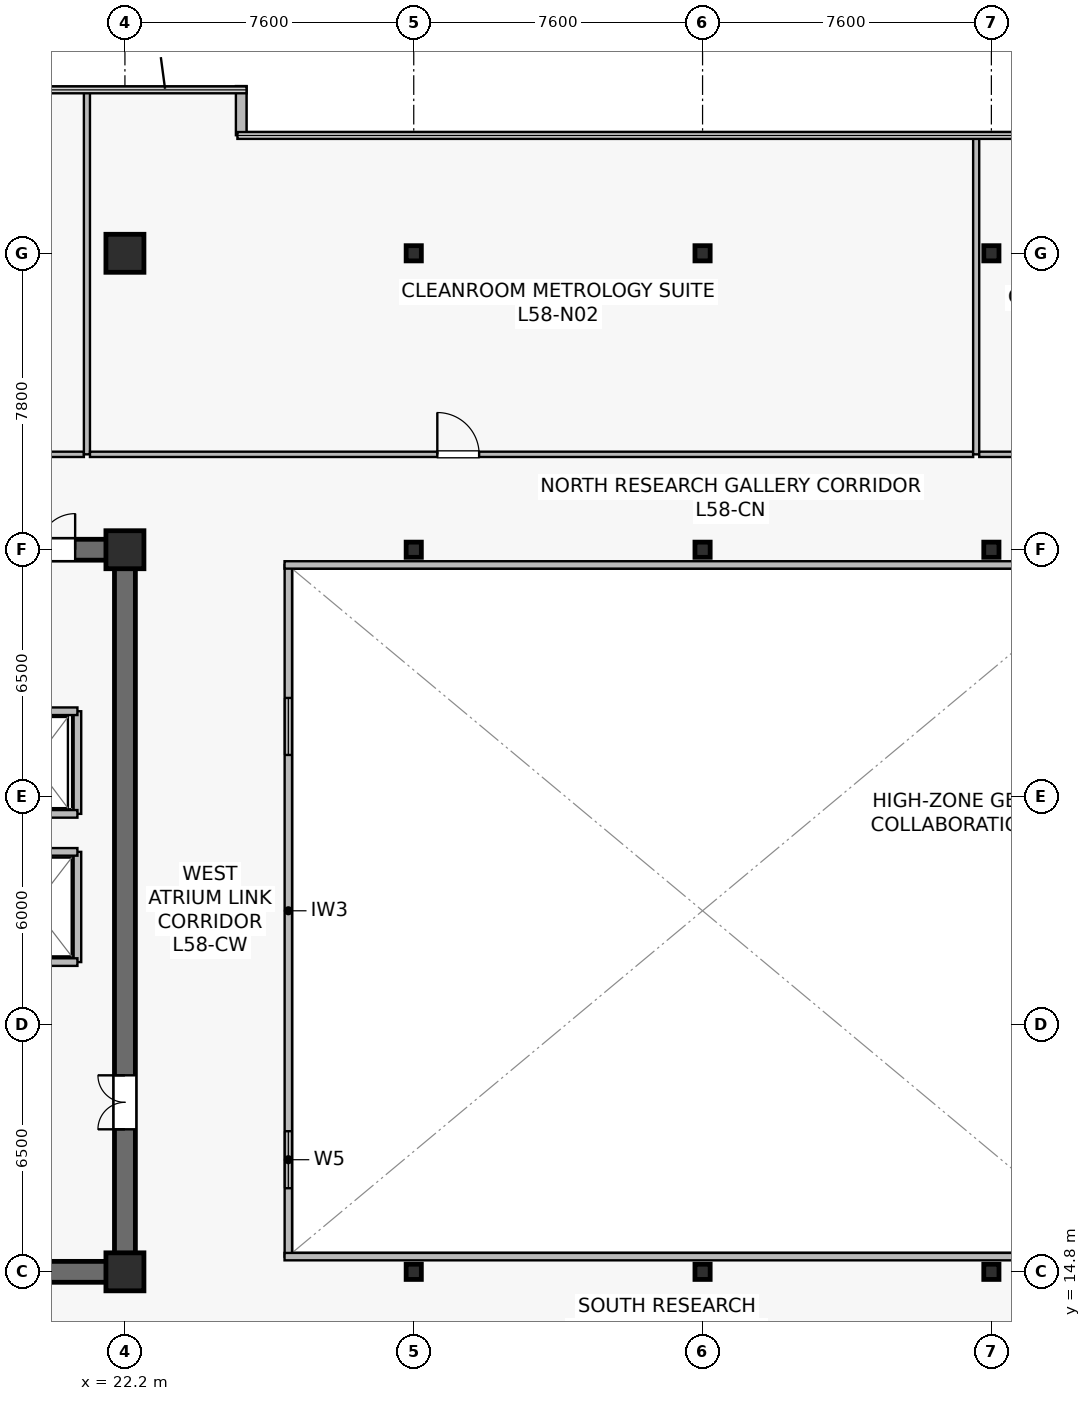
"""IFC4 building model, lengths in metres.
Left out: names, types, materials, properties, quantities, classifications, styles, units other than length and angle.
Written with IfcOpenShell. Run it as: python <this file> out.ifc"""

import sys

from ifc_helpers import new_model, si_unit, direction, frame, frame_2d, origin, origin_2d, place, context, subcontext, project, spatial, rectangle, hollow_rectangle, extrude, source, transform, mapped, element, fill, save


model = new_model("IFC4")
c1 = context("Model", 3, precision=1e-05, world=origin(), true_north=direction((0.0, 1.0)))
c2 = subcontext(c1, "Body", "Model", "MODEL_VIEW")
j1 = project(units=[si_unit("LENGTHUNIT", "METRE"), si_unit("PLANEANGLEUNIT", "RADIAN")], contexts=[c1])
p1 = place(None, origin())
s1 = spatial("IfcSite", under=j1, at=p1, CompositionType="ELEMENT")
p2 = place(p1, origin())
s2 = spatial("IfcBuilding", under=s1, at=p2, CompositionType="ELEMENT")
p3 = place(p2, frame((0.0, 0.0, 242.4)))
s3 = spatial("IfcBuildingStorey", under=s2, at=p3, CompositionType="ELEMENT", Elevation=242.4)
p4 = place(p3, frame((7.125, 14.8, 0.0), z_axis=(0.0, 0.0, 1.0), x_axis=(1.0, 0.0, 0.0)))
e1 = element("IfcWall", 1, at=p4, inside=s3, PredefinedType="SHEAR", context=c2, shape_type="SweptSolid", body=[
    extrude(rectangle(XDim=15.35, YDim=0.55, at=frame_2d((7.675, 0.0))), origin(), (0.0, 0.0, 1.0), 3.8),
])
p5 = place(p3, frame((7.125, 33.8, 0.0), z_axis=(0.0, 0.0, 1.0), x_axis=(1.0, 0.0, 0.0)))
e2 = element("IfcWall", 2, at=p5, inside=s3, PredefinedType="SHEAR", context=c2, shape_type="SweptSolid", body=[
    extrude(rectangle(XDim=15.35, YDim=0.55, at=frame_2d((7.675, 0.0))), origin(), (0.0, 0.0, 1.0), 3.8),
])
p6 = place(p5, frame((5.2, 0.0, 0.0)))
e3 = element("IfcOpeningElement", 3, at=p6, cuts=e2, PredefinedType="OPENING", context=c2, shape_type="SweptSolid", body=[
    extrude(rectangle(XDim=0.95, YDim=2.15, at=frame_2d((0.475, 1.075))), frame((0.0, 0.285, 0.0), z_axis=(0.0, -1.0, 0.0), x_axis=(1.0, 0.0, 0.0)), (0.0, 0.0, 1.0), 0.57),
])
p7 = place(p5, frame((7.715, 0.0, 0.0)))
e4 = element("IfcOpeningElement", 4, at=p7, cuts=e2, PredefinedType="OPENING", context=c2, shape_type="SweptSolid", body=[
    extrude(rectangle(XDim=0.95, YDim=2.15, at=frame_2d((0.475, 1.075))), frame((0.0, 0.285, 0.0), z_axis=(0.0, -1.0, 0.0), x_axis=(1.0, 0.0, 0.0)), (0.0, 0.0, 1.0), 0.57),
])
p8 = place(p5, frame((10.265, 0.0, 0.0)))
e5 = element("IfcOpeningElement", 5, at=p8, cuts=e2, PredefinedType="OPENING", context=c2, shape_type="SweptSolid", body=[
    extrude(rectangle(XDim=0.95, YDim=2.15, at=frame_2d((0.475, 1.075))), frame((0.0, 0.285, 0.0), z_axis=(0.0, -1.0, 0.0), x_axis=(1.0, 0.0, 0.0)), (0.0, 0.0, 1.0), 0.57),
])
p9 = place(p5, frame((12.815, 0.0, 0.0)))
e6 = element("IfcOpeningElement", 6, at=p9, cuts=e2, PredefinedType="OPENING", context=c2, shape_type="SweptSolid", body=[
    extrude(rectangle(XDim=0.95, YDim=2.15, at=frame_2d((0.475, 1.075))), frame((0.0, 0.285, 0.0), z_axis=(0.0, -1.0, 0.0), x_axis=(1.0, 0.0, 0.0)), (0.0, 0.0, 1.0), 0.57),
])
p10 = place(p3, frame((22.2, 15.075, 0.0), z_axis=(0.0, 0.0, 1.0), x_axis=(0.0, 1.0, 0.0)))
e7 = element("IfcWall", 7, at=p10, inside=s3, PredefinedType="SHEAR", context=c2, shape_type="SweptSolid", body=[
    extrude(rectangle(XDim=18.45, YDim=0.55, at=frame_2d((9.225, 0.0))), origin(), (0.0, 0.0, 1.0), 3.8),
])
p11 = place(p10, frame((3.475, 0.0, 0.0)))
e8 = element("IfcOpeningElement", 8, at=p11, cuts=e7, PredefinedType="OPENING", context=c2, shape_type="SweptSolid", body=[
    extrude(rectangle(XDim=1.42, YDim=2.2, at=frame_2d((0.71, 1.1))), frame((0.0, 0.285, 0.0), z_axis=(0.0, -1.0, 0.0), x_axis=(1.0, 0.0, 0.0)), (0.0, 0.0, 1.0), 0.57),
])
m1 = source(origin(), c2, "Body", "SweptSolid", [
    extrude(rectangle(XDim=1.0, YDim=1.0, at=origin_2d()), origin(), (0.0, 0.0, 1.0), 4.1),
])
for number, where, z_axis, x_axis in (
    (9, (22.2, 14.8, 0.0), (0.0, 0.0, 1.0), (1.0, 0.0, 0.0)),
    (10, (22.2, 33.8, 0.0), (0.0, 0.0, 1.0), (1.0, 0.0, 0.0)),
    (11, (22.2, 41.6, 0.0), (0.0, 0.0, 1.0), (1.0, 0.0, 0.0)),
):
    element("IfcColumn", number, at=place(p3, frame(where, z_axis=z_axis, x_axis=x_axis)), inside=s3, PredefinedType="COLUMN", context=c2, shape_type="MappedRepresentation", body=[
        mapped(m1, transform((0.0, 0.0, 0.0), scale=1.0)),
    ])
m2 = source(origin(), c2, "Body", "SweptSolid", [
    extrude(hollow_rectangle(XDim=0.4, YDim=0.4, WallThickness=0.019, at=origin_2d()), origin(), (0.0, 0.0, 1.0), 4.1),
])
for number, where, z_axis, x_axis in (
    (12, (29.8, 14.8, 0.0), (0.0, 0.0, 1.0), (1.0, 0.0, 0.0)),
    (13, (29.8, 33.8, 0.0), (0.0, 0.0, 1.0), (1.0, 0.0, 0.0)),
    (14, (29.8, 41.6, 0.0), (0.0, 0.0, 1.0), (1.0, 0.0, 0.0)),
    (15, (37.4, 14.8, 0.0), (0.0, 0.0, 1.0), (1.0, 0.0, 0.0)),
    (16, (37.4, 33.8, 0.0), (0.0, 0.0, 1.0), (1.0, 0.0, 0.0)),
    (17, (37.4, 41.6, 0.0), (0.0, 0.0, 1.0), (1.0, 0.0, 0.0)),
    (18, (45.0, 14.8, 0.0), (0.0, 0.0, 1.0), (1.0, 0.0, 0.0)),
    (19, (45.0, 33.8, 0.0), (0.0, 0.0, 1.0), (1.0, 0.0, 0.0)),
    (20, (45.0, 41.6, 0.0), (0.0, 0.0, 1.0), (1.0, 0.0, 0.0)),
):
    element("IfcColumn", number, at=place(p3, frame(where, z_axis=z_axis, x_axis=x_axis)), inside=s3, PredefinedType="COLUMN", context=c2, shape_type="MappedRepresentation", body=[
        mapped(m2, transform((0.0, 0.0, 0.0), scale=1.0)),
    ])
p12 = place(p3, frame((25.26, 44.707, 0.0), z_axis=(0.0, 0.0, 1.0), x_axis=(0.0, 1.0, 0.0)))
e21 = element("IfcWall", 21, at=p12, inside=s3, PredefinedType="STANDARD", context=c2, shape_type="SweptSolid", body=[
    extrude(rectangle(XDim=1.293, YDim=0.28, at=frame_2d((0.646, 0.0))), origin(), (0.0, 0.0, 1.0), 3.8),
])
p13 = place(p3, frame((20.95, 26.85, 0.0), z_axis=(0.0, 0.0, 1.0), x_axis=(0.0, 1.0, 0.0)))
e22 = element("IfcWall", 22, at=p13, inside=s3, PredefinedType="SOLIDWALL", context=c2, shape_type="SweptSolid", body=[
    extrude(rectangle(XDim=2.7, YDim=0.2, at=frame_2d((1.35, 0.0))), origin(), (0.0, 0.0, 1.0), 3.8),
])
p14 = place(p3, frame((18.76, 29.55, 0.0), z_axis=(0.0, 0.0, 1.0), x_axis=(1.0, 0.0, 0.0)))
e23 = element("IfcWall", 23, at=p14, inside=s3, PredefinedType="SOLIDWALL", context=c2, shape_type="SweptSolid", body=[
    extrude(rectangle(XDim=2.19, YDim=0.2, at=frame_2d((1.095, 0.0))), origin(), (0.0, 0.0, 1.0), 3.8),
])
p15 = place(p3, frame((18.76, 26.85, 0.0), z_axis=(0.0, 0.0, 1.0), x_axis=(1.0, 0.0, 0.0)))
e24 = element("IfcWall", 24, at=p15, inside=s3, PredefinedType="SOLIDWALL", context=c2, shape_type="SweptSolid", body=[
    extrude(rectangle(XDim=2.19, YDim=0.2, at=frame_2d((1.095, 0.0))), origin(), (0.0, 0.0, 1.0), 3.197),
])
p16 = place(p3, frame((20.95, 22.95, 0.0), z_axis=(0.0, 0.0, 1.0), x_axis=(0.0, 1.0, 0.0)))
e25 = element("IfcWall", 25, at=p16, inside=s3, PredefinedType="SOLIDWALL", context=c2, shape_type="SweptSolid", body=[
    extrude(rectangle(XDim=2.9, YDim=0.2, at=frame_2d((1.45, 0.0))), origin(), (0.0, 0.0, 1.0), 2.935),
])
for number, where, z_axis, x_axis in (
    (26, (18.76, 25.85, 0.0), (0.0, 0.0, 1.0), (1.0, 0.0, 0.0)),
    (27, (18.76, 22.95, 0.0), (0.0, 0.0, 1.0), (1.0, 0.0, 0.0)),
):
    element("IfcWall", number, at=place(p3, frame(where, z_axis=z_axis, x_axis=x_axis)), inside=s3, PredefinedType="SOLIDWALL", context=c2, shape_type="SweptSolid", body=[
        extrude(rectangle(XDim=2.19, YDim=0.2, at=frame_2d((1.095, 0.0))), origin(), (0.0, 0.0, 1.0), 3.8),
    ])
p17 = place(p3, frame((26.5, 15.2, 0.0), z_axis=(0.0, 0.0, 1.0), x_axis=(0.0, 1.0, 0.0)))
e28 = element("IfcWall", 28, at=p17, inside=s3, PredefinedType="SOLIDWALL", context=c2, shape_type="SweptSolid", body=[
    extrude(rectangle(XDim=18.2, YDim=0.195, at=frame_2d((9.1, 0.0))), origin(), (0.0, 0.0, 1.0), 3.8),
])
p18 = place(p17, frame((1.8, 0.0, 0.9)))
e29 = element("IfcOpeningElement", 29, at=p18, cuts=e28, PredefinedType="OPENING", context=c2, shape_type="SweptSolid", body=[
    extrude(rectangle(XDim=1.5, YDim=1.4, at=frame_2d((0.75, 0.7))), frame((0.0, 0.107, 0.0), z_axis=(0.0, -1.0, 0.0), x_axis=(1.0, 0.0, 0.0)), (0.0, 0.0, 1.0), 0.215),
])
p19 = place(p17, frame((13.2, 0.0, 0.9)))
e30 = element("IfcOpeningElement", 30, at=p19, cuts=e28, PredefinedType="OPENING", context=c2, shape_type="SweptSolid", body=[
    extrude(rectangle(XDim=1.5, YDim=1.4, at=frame_2d((0.75, 0.7))), frame((0.0, 0.107, 0.0), z_axis=(0.0, -1.0, 0.0), x_axis=(1.0, 0.0, 0.0)), (0.0, 0.0, 1.0), 0.215),
])
for number, where, z_axis, x_axis in (
    (31, (26.4, 15.2, 0.0), (0.0, 0.0, 1.0), (1.0, 0.0, 0.0)),
    (32, (26.4, 33.4, 0.0), (0.0, 0.0, 1.0), (1.0, 0.0, 0.0)),
):
    element("IfcWall", number, at=place(p3, frame(where, z_axis=z_axis, x_axis=x_axis)), inside=s3, PredefinedType="SOLIDWALL", context=c2, shape_type="SweptSolid", body=[
        extrude(rectangle(XDim=22.0, YDim=0.195, at=frame_2d((11.0, 0.0))), origin(), (0.0, 0.0, 1.0), 3.8),
    ])
p20 = place(p3, frame((7.31, 36.31, 0.0), z_axis=(0.0, 0.0, 1.0), x_axis=(1.0, 0.0, 0.0)))
e33 = element("IfcWall", 33, at=p20, inside=s3, PredefinedType="PARTITIONING", context=c2, shape_type="SweptSolid", body=[
    extrude(rectangle(XDim=13.81, YDim=0.14, at=frame_2d((6.905, 0.0))), origin(), (0.0, 0.0, 1.0), 3.197),
])
p21 = place(p20, frame((6.715, 0.0, 0.0)))
e34 = element("IfcOpeningElement", 34, at=p21, cuts=e33, PredefinedType="OPENING", context=c2, shape_type="SweptSolid", body=[
    extrude(rectangle(XDim=1.1, YDim=2.18, at=frame_2d((0.55, 1.09))), frame((0.0, 0.08, 0.0), z_axis=(0.0, -1.0, 0.0), x_axis=(1.0, 0.0, 0.0)), (0.0, 0.0, 1.0), 0.16),
])
p22 = place(p3, frame((21.2, 36.31, 0.0), z_axis=(0.0, 0.0, 1.0), x_axis=(0.0, 1.0, 0.0)))
e35 = element("IfcWall", 35, at=p22, inside=s3, PredefinedType="PARTITIONING", context=c2, shape_type="SweptSolid", body=[
    extrude(rectangle(XDim=9.58, YDim=0.16, at=frame_2d((4.79, 0.0))), origin(), (0.0, 0.0, 1.0), 3.135),
])
p23 = place(p3, frame((21.28, 36.31, 0.0), z_axis=(0.0, 0.0, 1.0), x_axis=(1.0, 0.0, 0.0)))
e36 = element("IfcWall", 36, at=p23, inside=s3, PredefinedType="PARTITIONING", context=c2, shape_type="SweptSolid", body=[
    extrude(rectangle(XDim=23.24, YDim=0.14, at=frame_2d((11.62, 0.0))), origin(), (0.0, 0.0, 1.0), 3.197),
])
p24 = place(p23, frame((9.14, 0.0, 0.0)))
e37 = element("IfcOpeningElement", 37, at=p24, cuts=e36, PredefinedType="OPENING", context=c2, shape_type="SweptSolid", body=[
    extrude(rectangle(XDim=1.1, YDim=2.18, at=frame_2d((0.55, 1.09))), frame((0.0, 0.08, 0.0), z_axis=(0.0, -1.0, 0.0), x_axis=(1.0, 0.0, 0.0)), (0.0, 0.0, 1.0), 0.16),
])
p25 = place(p3, frame((44.6, 36.31, 0.0), z_axis=(0.0, 0.0, 1.0), x_axis=(0.0, 1.0, 0.0)))
e38 = element("IfcWall", 38, at=p25, inside=s3, PredefinedType="PARTITIONING", context=c2, shape_type="SweptSolid", body=[
    extrude(rectangle(XDim=8.38, YDim=0.16, at=frame_2d((4.19, 0.0))), origin(), (0.0, 0.0, 1.0), 3.135),
])
p26 = place(p3, frame((44.68, 36.31, 0.0), z_axis=(0.0, 0.0, 1.0), x_axis=(1.0, 0.0, 0.0)))
e39 = element("IfcWall", 39, at=p26, inside=s3, PredefinedType="PARTITIONING", context=c2, shape_type="SweptSolid", body=[
    extrude(rectangle(XDim=22.81, YDim=0.14, at=frame_2d((11.405, 0.0))), origin(), (0.0, 0.0, 1.0), 3.197),
])
p27 = place(p26, frame((11.485, 0.0, 0.0)))
e40 = element("IfcOpeningElement", 40, at=p27, cuts=e39, PredefinedType="OPENING", context=c2, shape_type="SweptSolid", body=[
    extrude(rectangle(XDim=1.1, YDim=2.18, at=frame_2d((0.55, 1.09))), frame((0.0, 0.08, 0.0), z_axis=(0.0, -1.0, 0.0), x_axis=(1.0, 0.0, 0.0)), (0.0, 0.0, 1.0), 0.16),
])
m3 = source(origin(), c2, "Body", "SweptSolid", [
    extrude(rectangle(XDim=1.5, YDim=1.4, at=frame_2d((0.75, 0.7))), frame((0.0, 0.03, 0.0), z_axis=(0.0, -1.0, 0.0), x_axis=(1.0, 0.0, 0.0)), (0.0, 0.0, 1.0), 0.06),
])
p28 = place(p18, origin())
e41 = element("IfcWindow", 41, at=p28, inside=s3, PartitioningType="SINGLE_PANEL", PredefinedType="WINDOW", context=c2, shape_type="MappedRepresentation", body=[
    mapped(m3, transform((0.0, 0.0, 0.0), scale=1.0)),
])
fill(e29, e41)
p29 = place(p19, origin())
e42 = element("IfcWindow", 42, at=p29, inside=s3, PartitioningType="SINGLE_PANEL", PredefinedType="WINDOW", context=c2, shape_type="MappedRepresentation", body=[
    mapped(m3, transform((0.0, 0.0, 0.0), scale=1.0)),
])
fill(e30, e42)
m4 = source(origin(), c2, "Body", "SweptSolid", [
    extrude(rectangle(XDim=1.42, YDim=2.2, at=frame_2d((0.71, 1.1))), frame((0.0, 0.025, 0.0), z_axis=(0.0, -1.0, 0.0), x_axis=(1.0, 0.0, 0.0)), (0.0, 0.0, 1.0), 0.05),
])
p30 = place(p11, origin())
e43 = element("IfcDoor", 43, at=p30, inside=s3, OperationType="DOUBLE_DOOR_SINGLE_SWING", PredefinedType="DOOR", context=c2, shape_type="MappedRepresentation", body=[
    mapped(m4, transform((0.0, 0.0, 0.0), scale=1.0)),
])
fill(e8, e43)
m5 = source(origin(), c2, "Body", "SweptSolid", [
    extrude(rectangle(XDim=0.95, YDim=2.15, at=frame_2d((0.475, 1.075))), frame((0.0, 0.025, 0.0), z_axis=(0.0, -1.0, 0.0), x_axis=(1.0, 0.0, 0.0)), (0.0, 0.0, 1.0), 0.05),
])
p31 = place(p9, origin())
e44 = element("IfcDoor", 44, at=p31, inside=s3, OperationType="SINGLE_SWING_RIGHT", PredefinedType="DOOR", context=c2, shape_type="MappedRepresentation", body=[
    mapped(m5, transform((0.0, 0.0, 0.0), scale=1.0)),
])
fill(e6, e44)
m6 = source(origin(), c2, "Body", "SweptSolid", [
    extrude(rectangle(XDim=1.1, YDim=2.18, at=frame_2d((0.55, 1.09))), frame((0.0, 0.025, 0.0), z_axis=(0.0, -1.0, 0.0), x_axis=(1.0, 0.0, 0.0)), (0.0, 0.0, 1.0), 0.05),
])
p32 = place(p24, origin())
e45 = element("IfcDoor", 45, at=p32, inside=s3, OperationType="SINGLE_SWING_LEFT", PredefinedType="DOOR", context=c2, shape_type="MappedRepresentation", body=[
    mapped(m6, transform((0.0, 0.0, 0.0), scale=1.0)),
])
fill(e37, e45)
save(model, sys.argv[1])
